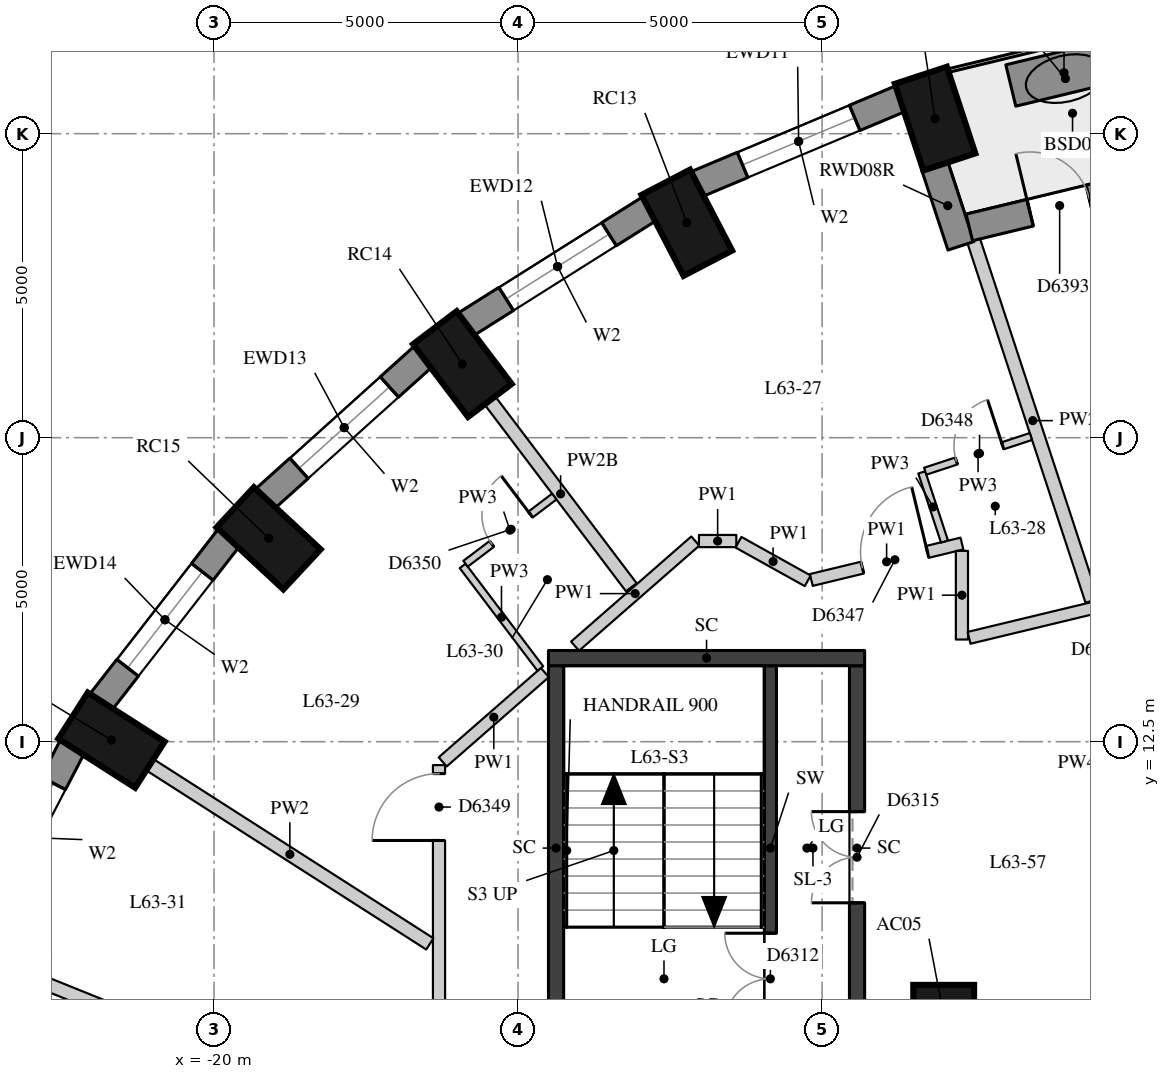
"""IFC4 building model, lengths in metres.
Left out: names, types, materials, properties, quantities, classifications, styles, units other than length and angle.
Written with IfcOpenShell. Run it as: python <this file> out.ifc"""

import sys

from ifc_helpers import new_model, si_unit, direction, frame, frame_2d, origin, origin_2d, place, context, subcontext, project, spatial, rectangle, extrude, element, fill, save


model = new_model("IFC4")
c1 = context("Model", 3, precision=1e-05, world=origin(), true_north=direction((0.0, 1.0)))
c2 = subcontext(c1, "Body", "Model", "MODEL_VIEW")
j1 = project(units=[si_unit("LENGTHUNIT", "METRE"), si_unit("PLANEANGLEUNIT", "RADIAN")], contexts=[c1])
p1 = place(None, origin())
s1 = spatial("IfcSite", under=j1, at=p1, CompositionType="ELEMENT")
p2 = place(p1, origin())
s2 = spatial("IfcBuilding", under=s1, at=p2, CompositionType="ELEMENT")
p3 = place(p2, frame((0.0, 0.0, 222.2)))
s3 = spatial("IfcBuildingStorey", under=s2, at=p3, CompositionType="ELEMENT", Elevation=222.2)
for number, where, z_axis, x_axis in (
    (1, (-8.141, 22.748, 0.0), (0.0, 0.0, 1.0), (-0.312, 0.95, 0.0)),
    (2, (-12.225, 21.035, 0.0), (0.0, 0.0, 1.0), (-0.462, 0.887, 0.0)),
    (3, (-15.916, 18.71, 0.0), (0.0, 0.0, 1.0), (-0.604, 0.797, 0.0)),
    (4, (-19.102, 15.845, 0.0), (0.0, 0.0, 1.0), (-0.732, 0.681, 0.0)),
    (5, (-21.687, 12.525, 0.0), (0.0, 0.0, 1.0), (-0.842, 0.539, 0.0)),
):
    element("IfcColumn", number, at=place(p3, frame(where, z_axis=z_axis, x_axis=x_axis)), inside=s3, PredefinedType="COLUMN", context=c2, shape_type="SweptSolid", body=[
        extrude(rectangle(XDim=1.5, YDim=0.9, at=origin_2d()), origin(), (0.0, 0.0, 1.0), 3.3),
    ])
p4 = place(p3, frame((-8.0, 8.0, 0.0), z_axis=(0.0, 0.0, 1.0), x_axis=(1.0, 0.0, 0.0)))
e6 = element("IfcColumn", 6, at=p4, inside=s3, PredefinedType="COLUMN", context=c2, shape_type="SweptSolid", body=[
    extrude(rectangle(XDim=1.0, YDim=1.0, at=origin_2d()), origin(), (0.0, 0.0, 1.0), 3.3),
])
p5 = place(p3, frame((-8.703, 23.079, 0.0), z_axis=(0.0, 0.0, 1.0), x_axis=(-0.922168222612, -0.386789050006, 0.0)))
e7 = element("IfcWall", 7, at=p5, inside=s3, PredefinedType="SOLIDWALL", context=c2, shape_type="SweptSolid", body=[
    extrude(rectangle(XDim=3.651, YDim=0.45, at=frame_2d((1.825, 0.0))), origin(), (0.0, 0.0, 1.0), 3.02),
])
p6 = place(p5, frame((0.825, 0.0, 0.4)))
e8 = element("IfcOpeningElement", 8, at=p6, cuts=e7, PredefinedType="OPENING", context=c2, shape_type="SweptSolid", body=[
    extrude(rectangle(XDim=2.0, YDim=1.75, at=frame_2d((1.0, 0.875))), frame((0.0, 0.235, 0.0), z_axis=(0.0, -1.0, 0.0), x_axis=(1.0, 0.0, 0.0)), (0.0, 0.0, 1.0), 0.47),
])
p7 = place(p3, frame((-12.832, 21.27, 0.0), z_axis=(0.0, 0.0, 1.0), x_axis=(-0.846138482752, -0.532963101918, 0.0)))
e9 = element("IfcWall", 9, at=p7, inside=s3, PredefinedType="SOLIDWALL", context=c2, shape_type="SweptSolid", body=[
    extrude(rectangle(XDim=3.587, YDim=0.45, at=frame_2d((1.793, 0.0))), origin(), (0.0, 0.0, 1.0), 3.02),
])
p8 = place(p7, frame((0.793, 0.0, 0.4)))
e10 = element("IfcOpeningElement", 10, at=p8, cuts=e9, PredefinedType="OPENING", context=c2, shape_type="SweptSolid", body=[
    extrude(rectangle(XDim=2.0, YDim=1.75, at=frame_2d((1.0, 0.875))), frame((0.0, 0.235, 0.0), z_axis=(0.0, -1.0, 0.0), x_axis=(1.0, 0.0, 0.0)), (0.0, 0.0, 1.0), 0.47),
])
p9 = place(p3, frame((-16.553, 18.84, 0.0), z_axis=(0.0, 0.0, 1.0), x_axis=(-0.743442727602, -0.668799604348, 0.0)))
e11 = element("IfcWall", 11, at=p9, inside=s3, PredefinedType="SOLIDWALL", context=c2, shape_type="SweptSolid", body=[
    extrude(rectangle(XDim=3.513, YDim=0.45, at=frame_2d((1.756, 0.0))), origin(), (0.0, 0.0, 1.0), 3.02),
])
p10 = place(p9, frame((0.756, 0.0, 0.4)))
e12 = element("IfcOpeningElement", 12, at=p10, cuts=e11, PredefinedType="OPENING", context=c2, shape_type="SweptSolid", body=[
    extrude(rectangle(XDim=2.0, YDim=1.75, at=frame_2d((1.0, 0.875))), frame((0.0, 0.235, 0.0), z_axis=(0.0, -1.0, 0.0), x_axis=(1.0, 0.0, 0.0)), (0.0, 0.0, 1.0), 0.47),
])
p11 = place(p3, frame((-19.751, 15.861, 0.0), z_axis=(0.0, 0.0, 1.0), x_axis=(-0.614220816451, -0.789134201919, 0.0)))
e13 = element("IfcWall", 13, at=p11, inside=s3, PredefinedType="SOLIDWALL", context=c2, shape_type="SweptSolid", body=[
    extrude(rectangle(XDim=3.438, YDim=0.45, at=frame_2d((1.719, 0.0))), origin(), (0.0, 0.0, 1.0), 3.02),
])
p12 = place(p11, frame((0.719, 0.0, 0.4)))
e14 = element("IfcOpeningElement", 14, at=p12, cuts=e13, PredefinedType="OPENING", context=c2, shape_type="SweptSolid", body=[
    extrude(rectangle(XDim=2.0, YDim=1.75, at=frame_2d((1.0, 0.875))), frame((0.0, 0.235, 0.0), z_axis=(0.0, -1.0, 0.0), x_axis=(1.0, 0.0, 0.0)), (0.0, 0.0, 1.0), 0.47),
])
p13 = place(p3, frame((-22.327, 12.424, 0.0), z_axis=(0.0, 0.0, 1.0), x_axis=(-0.460232593174, -0.887798378113, 0.0)))
e15 = element("IfcWall", 15, at=p13, inside=s3, PredefinedType="SOLIDWALL", context=c2, shape_type="SweptSolid", body=[
    extrude(rectangle(XDim=3.371, YDim=0.45, at=frame_2d((1.685, 0.0))), origin(), (0.0, 0.0, 1.0), 3.02),
])
p14 = place(p13, frame((0.685, 0.0, 0.4)))
e16 = element("IfcOpeningElement", 16, at=p14, cuts=e15, PredefinedType="OPENING", context=c2, shape_type="SweptSolid", body=[
    extrude(rectangle(XDim=2.0, YDim=1.75, at=frame_2d((1.0, 0.875))), frame((0.0, 0.235, 0.0), z_axis=(0.0, -1.0, 0.0), x_axis=(1.0, 0.0, 0.0)), (0.0, 0.0, 1.0), 0.47),
])
p15 = place(p3, frame((-8.15, 21.977, 0.0), z_axis=(0.0, 0.0, 1.0), x_axis=(0.312062715826, -0.950061504005, 0.0)))
e17 = element("IfcWall", 17, at=p15, inside=s3, PredefinedType="SOLIDWALL", context=c2, shape_type="SweptSolid", body=[
    extrude(rectangle(XDim=1.39, YDim=0.45, at=frame_2d((0.695, 0.0))), origin(), (0.0, 0.0, 1.0), 3.02),
])
p16 = place(p3, frame((-3.489, 21.947, 0.0), z_axis=(0.0, 0.0, 1.0), x_axis=(-0.972007311035, -0.234950606076, 0.0)))
e18 = element("IfcWall", 18, at=p16, inside=s3, PredefinedType="SOLIDWALL", context=c2, shape_type="SweptSolid", body=[
    extrude(rectangle(XDim=4.207, YDim=0.45, at=frame_2d((2.104, 0.0))), origin(), (0.0, 0.0, 1.0), 3.02),
])
p17 = place(p16, frame((1.029, 0.0, 0.4)))
e19 = element("IfcOpeningElement", 19, at=p17, cuts=e18, PredefinedType="OPENING", context=c2, shape_type="SweptSolid", body=[
    extrude(rectangle(XDim=1.0, YDim=1.75, at=frame_2d((0.5, 0.875))), frame((0.0, 0.235, 0.0), z_axis=(0.0, -1.0, 0.0), x_axis=(1.0, 0.0, 0.0)), (0.0, 0.0, 1.0), 0.47),
])
p18 = place(p16, frame((2.179, 0.0, 0.0)))
e20 = element("IfcOpeningElement", 20, at=p18, cuts=e18, PredefinedType="OPENING", context=c2, shape_type="SweptSolid", body=[
    extrude(rectangle(XDim=1.0, YDim=2.15, at=frame_2d((0.5, 1.075))), frame((0.0, 0.235, 0.0), z_axis=(0.0, -1.0, 0.0), x_axis=(1.0, 0.0, 0.0)), (0.0, 0.0, 1.0), 0.47),
])
p19 = place(p3, frame((-5.146, 23.714, 0.0), z_axis=(0.0, 0.0, 1.0), x_axis=(-0.972142986016, -0.234388597717, 0.0)))
e21 = element("IfcWall", 21, at=p19, inside=s3, PredefinedType="USERDEFINED", context=c2, shape_type="SweptSolid", body=[
    extrude(rectangle(XDim=1.8, YDim=0.7, at=frame_2d((0.9, 0.0))), origin(), (0.0, 0.0, 1.0), 0.75),
])
p20 = place(p3, frame((-10.85, 7.75, 0.0), z_axis=(0.0, 0.0, 1.0), x_axis=(0.0, 1.0, 0.0)))
e22 = element("IfcWall", 22, at=p20, inside=s3, PredefinedType="SHEAR", context=c2, shape_type="SweptSolid", body=[
    extrude(rectangle(XDim=6.0, YDim=0.2, at=frame_2d((3.0, 0.0))), origin(), (0.0, 0.0, 1.0), 3.02),
])
p21 = place(p20, frame((0.1, 0.0, 0.0)))
e23 = element("IfcOpeningElement", 23, at=p21, cuts=e22, PredefinedType="OPENING", context=c2, shape_type="SweptSolid", body=[
    extrude(rectangle(XDim=1.5, YDim=2.1, at=frame_2d((0.75, 1.05))), frame((0.0, 0.11, 0.0), z_axis=(0.0, -1.0, 0.0), x_axis=(1.0, 0.0, 0.0)), (0.0, 0.0, 1.0), 0.22),
])
p22 = place(p3, frame((-14.375, 7.75, -0.28), z_axis=(0.0, 0.0, 1.0), x_axis=(0.0, 1.0, 0.0)))
e24 = element("IfcWall", 24, at=p22, inside=s3, PredefinedType="SHEAR", context=c2, shape_type="SweptSolid", body=[
    extrude(rectangle(XDim=6.0, YDim=0.25, at=frame_2d((3.0, 0.0))), origin(), (0.0, 0.0, 1.0), 3.3),
])
p23 = place(p3, frame((-9.425, 7.75, -0.28), z_axis=(0.0, 0.0, 1.0), x_axis=(0.0, 1.0, 0.0)))
e25 = element("IfcWall", 25, at=p23, inside=s3, PredefinedType="SHEAR", context=c2, shape_type="SweptSolid", body=[
    extrude(rectangle(XDim=6.0, YDim=0.25, at=frame_2d((3.0, 0.0))), origin(), (0.0, 0.0, 1.0), 3.3),
])
p24 = place(p23, frame((2.1, 0.0, 0.28)))
e26 = element("IfcOpeningElement", 26, at=p24, cuts=e25, PredefinedType="OPENING", context=c2, shape_type="SweptSolid", body=[
    extrude(rectangle(XDim=1.5, YDim=2.1, at=frame_2d((0.75, 1.05))), frame((0.0, 0.135, 0.0), z_axis=(0.0, -1.0, 0.0), x_axis=(1.0, 0.0, 0.0)), (0.0, 0.0, 1.0), 0.27),
])
p25 = place(p3, frame((-14.5, 13.875, -0.28), z_axis=(0.0, 0.0, 1.0), x_axis=(1.0, 0.0, 0.0)))
e27 = element("IfcWall", 27, at=p25, inside=s3, PredefinedType="SHEAR", context=c2, shape_type="SweptSolid", body=[
    extrude(rectangle(XDim=5.2, YDim=0.25, at=frame_2d((2.6, 0.0))), origin(), (0.0, 0.0, 1.0), 3.3),
])
p26 = place(p3, frame((-16.3, 3.922, 0.0), z_axis=(0.0, 0.0, 1.0), x_axis=(0.0, 1.0, 0.0)))
e28 = element("IfcWall", 28, at=p26, inside=s3, PredefinedType="PARTITIONING", context=c2, shape_type="SweptSolid", body=[
    extrude(rectangle(XDim=8.193, YDim=0.2, at=frame_2d((4.097, 0.0))), origin(), (0.0, 0.0, 1.0), 3.02),
])
p27 = place(p26, frame((6.953, 0.0, 0.0)))
e29 = element("IfcOpeningElement", 29, at=p27, cuts=e28, PredefinedType="OPENING", context=c2, shape_type="SweptSolid", body=[
    extrude(rectangle(XDim=1.1, YDim=2.1, at=frame_2d((0.55, 1.05))), frame((0.0, 0.11, 0.0), z_axis=(0.0, -1.0, 0.0), x_axis=(1.0, 0.0, 0.0)), (0.0, 0.0, 1.0), 0.22),
])
p28 = place(p26, frame((3.123, 0.0, 0.0)))
e30 = element("IfcOpeningElement", 30, at=p28, cuts=e28, PredefinedType="OPENING", context=c2, shape_type="SweptSolid", body=[
    extrude(rectangle(XDim=0.9, YDim=2.1, at=frame_2d((0.45, 1.05))), frame((0.0, 0.11, 0.0), z_axis=(0.0, -1.0, 0.0), x_axis=(1.0, 0.0, 0.0)), (0.0, 0.0, 1.0), 0.22),
])
p29 = place(p3, frame((-16.24, 12.168, 0.0), z_axis=(0.0, 0.0, 1.0), x_axis=(0.752820521129, 0.658225844956, 0.0)))
e31 = element("IfcWall", 31, at=p29, inside=s3, PredefinedType="PARTITIONING", context=c2, shape_type="SweptSolid", body=[
    extrude(rectangle(XDim=2.232, YDim=0.2, at=frame_2d((1.116, 0.0))), origin(), (0.0, 0.0, 1.0), 3.02),
])
p30 = place(p3, frame((-14.063, 14.071, 0.0), z_axis=(0.0, 0.0, 1.0), x_axis=(0.752870230185, 0.6581689878, 0.0)))
e32 = element("IfcWall", 32, at=p30, inside=s3, PredefinedType="PARTITIONING", context=c2, shape_type="SweptSolid", body=[
    extrude(rectangle(XDim=2.627, YDim=0.2, at=frame_2d((1.313, 0.0))), origin(), (0.0, 0.0, 1.0), 3.02),
])
p31 = place(p3, frame((-12.025, 15.8, 0.0), z_axis=(0.0, 0.0, 1.0), x_axis=(1.0, 0.0, 0.0)))
e33 = element("IfcWall", 33, at=p31, inside=s3, PredefinedType="PARTITIONING", context=c2, shape_type="SweptSolid", body=[
    extrude(rectangle(XDim=0.615, YDim=0.2, at=frame_2d((0.307, 0.0))), origin(), (0.0, 0.0, 1.0), 3.02),
])
p32 = place(p3, frame((-11.375, 15.781, 0.0), z_axis=(0.0, 0.0, 1.0), x_axis=(0.873538410035, -0.486755222051, 0.0)))
e34 = element("IfcWall", 34, at=p32, inside=s3, PredefinedType="PARTITIONING", context=c2, shape_type="SweptSolid", body=[
    extrude(rectangle(XDim=1.304, YDim=0.2, at=frame_2d((0.652, 0.0))), origin(), (0.0, 0.0, 1.0), 3.02),
])
p33 = place(p3, frame((-10.177, 15.16, 0.0), z_axis=(0.0, 0.0, 1.0), x_axis=(0.971984190663, 0.235046236094, 0.0)))
e35 = element("IfcWall", 35, at=p33, inside=s3, PredefinedType="PARTITIONING", context=c2, shape_type="SweptSolid", body=[
    extrude(rectangle(XDim=2.549, YDim=0.2, at=frame_2d((1.274, 0.0))), origin(), (0.0, 0.0, 1.0), 3.02),
])
p34 = place(p33, frame((0.865, 0.0, 0.0)))
e36 = element("IfcOpeningElement", 36, at=p34, cuts=e35, PredefinedType="OPENING", context=c2, shape_type="SweptSolid", body=[
    extrude(rectangle(XDim=1.1, YDim=2.1, at=frame_2d((0.55, 1.05))), frame((0.0, 0.11, 0.0), z_axis=(0.0, -1.0, 0.0), x_axis=(1.0, 0.0, 0.0)), (0.0, 0.0, 1.0), 0.22),
])
p35 = place(p3, frame((-7.7, 15.639, 0.0), z_axis=(0.0, 0.0, 1.0), x_axis=(0.0, -1.0, 0.0)))
e37 = element("IfcWall", 37, at=p35, inside=s3, PredefinedType="PARTITIONING", context=c2, shape_type="SweptSolid", body=[
    extrude(rectangle(XDim=1.458, YDim=0.2, at=frame_2d((0.729, 0.0))), origin(), (0.0, 0.0, 1.0), 3.02),
])
p36 = place(p3, frame((-7.583, 14.208, 0.0), z_axis=(0.0, 0.0, 1.0), x_axis=(0.972284712223, 0.233799996531, 0.0)))
e38 = element("IfcWall", 38, at=p36, inside=s3, PredefinedType="PARTITIONING", context=c2, shape_type="SweptSolid", body=[
    extrude(rectangle(XDim=8.519, YDim=0.2, at=frame_2d((4.259, 0.0))), origin(), (0.0, 0.0, 1.0), 2.42),
])
p37 = place(p36, frame((5.667, 0.0, 0.0)))
e39 = element("IfcOpeningElement", 39, at=p37, cuts=e38, PredefinedType="OPENING", context=c2, shape_type="SweptSolid", body=[
    extrude(rectangle(XDim=0.9, YDim=2.1, at=frame_2d((0.45, 1.05))), frame((0.0, 0.11, 0.0), z_axis=(0.0, -1.0, 0.0), x_axis=(1.0, 0.0, 0.0)), (0.0, 0.0, 1.0), 0.22),
])
p38 = place(p36, frame((2.674, 0.0, 0.0)))
e40 = element("IfcOpeningElement", 40, at=p38, cuts=e38, PredefinedType="OPENING", context=c2, shape_type="SweptSolid", body=[
    extrude(rectangle(XDim=0.9, YDim=2.1, at=frame_2d((0.45, 1.05))), frame((0.0, 0.11, 0.0), z_axis=(0.0, -1.0, 0.0), x_axis=(1.0, 0.0, 0.0)), (0.0, 0.0, 1.0), 0.22),
])
p39 = place(p3, frame((-7.508, 20.743, 0.0), z_axis=(0.0, 0.0, 1.0), x_axis=(0.311985211021, -0.95008695818, 0.0)))
e41 = element("IfcWall", 41, at=p39, inside=s3, PredefinedType="PARTITIONING", context=c2, shape_type="SweptSolid", body=[
    extrude(rectangle(XDim=6.237, YDim=0.22, at=frame_2d((3.118, 0.0))), origin(), (0.0, 0.0, 1.0), 3.02),
])
p40 = place(p3, frame((-15.463, 18.113, 0.0), z_axis=(0.0, 0.0, 1.0), x_axis=(0.603591792806, -0.79729351412, 0.0)))
e42 = element("IfcWall", 42, at=p40, inside=s3, PredefinedType="PARTITIONING", context=c2, shape_type="SweptSolid", body=[
    extrude(rectangle(XDim=3.854, YDim=0.22, at=frame_2d((1.927, 0.0))), origin(), (0.0, 0.0, 1.0), 2.57),
])
p41 = place(p3, frame((-21.055, 12.121, 0.0), z_axis=(0.0, 0.0, 1.0), x_axis=(0.842286811608, -0.539029616061, 0.0)))
e43 = element("IfcWall", 43, at=p41, inside=s3, PredefinedType="PARTITIONING", context=c2, shape_type="SweptSolid", body=[
    extrude(rectangle(XDim=5.466, YDim=0.22, at=frame_2d((2.733, 0.0))), origin(), (0.0, 0.0, 1.0), 3.02),
])
p42 = place(p3, frame((-22.896, 8.571, 0.0), z_axis=(0.0, 0.0, 1.0), x_axis=(0.927387137769, -0.374103056256, 0.0)))
e44 = element("IfcWall", 44, at=p42, inside=s3, PredefinedType="PARTITIONING", context=c2, shape_type="SweptSolid", body=[
    extrude(rectangle(XDim=6.964, YDim=0.22, at=frame_2d((3.482, 0.0))), origin(), (0.0, 0.0, 1.0), 3.02),
])
p43 = place(p3, frame((-7.987, 15.792, 0.0), z_axis=(0.0, 0.0, 1.0), x_axis=(-0.312187467963, 0.950020518119, 0.0)))
e45 = element("IfcWall", 45, at=p43, inside=s3, PredefinedType="PARTITIONING", context=c2, shape_type="SweptSolid", body=[
    extrude(rectangle(XDim=1.197, YDim=0.12, at=frame_2d((0.599, 0.0))), origin(), (0.0, 0.0, 1.0), 3.02),
])
p44 = place(p3, frame((-14.634, 13.704, 0.0), z_axis=(0.0, 0.0, 1.0), x_axis=(-0.603613230526, 0.797277284221, 0.0)))
e46 = element("IfcWall", 46, at=p44, inside=s3, PredefinedType="PARTITIONING", context=c2, shape_type="SweptSolid", body=[
    extrude(rectangle(XDim=2.115, YDim=0.12, at=frame_2d((1.058, 0.0))), origin(), (0.0, 0.0, 1.0), 3.02),
])
p45 = place(p3, frame((-8.304, 16.948, 0.0), z_axis=(0.0, 0.0, 1.0), x_axis=(0.95011423119, 0.311902144415, 0.0)))
e47 = element("IfcWall", 47, at=p45, inside=s3, PredefinedType="PARTITIONING", context=c2, shape_type="SweptSolid", body=[
    extrude(rectangle(XDim=1.83, YDim=0.12, at=frame_2d((0.915, 0.0))), origin(), (0.0, 0.0, 1.0), 3.02),
])
p46 = place(p45, frame((0.54, 0.0, 0.0)))
e48 = element("IfcOpeningElement", 48, at=p46, cuts=e47, PredefinedType="OPENING", context=c2, shape_type="SweptSolid", body=[
    extrude(rectangle(XDim=0.8, YDim=2.1, at=frame_2d((0.4, 1.05))), frame((0.0, 0.07, 0.0), z_axis=(0.0, -1.0, 0.0), x_axis=(1.0, 0.0, 0.0)), (0.0, 0.0, 1.0), 0.14),
])
p47 = place(p3, frame((-15.863, 15.427, 0.0), z_axis=(0.0, 0.0, 1.0), x_axis=(0.79730226728, 0.603580230451, 0.0)))
e49 = element("IfcWall", 49, at=p47, inside=s3, PredefinedType="PARTITIONING", context=c2, shape_type="SweptSolid", body=[
    extrude(rectangle(XDim=1.83, YDim=0.12, at=frame_2d((0.915, 0.0))), origin(), (0.0, 0.0, 1.0), 3.02),
])
p48 = place(p47, frame((0.54, 0.0, 0.0)))
e50 = element("IfcOpeningElement", 50, at=p48, cuts=e49, PredefinedType="OPENING", context=c2, shape_type="SweptSolid", body=[
    extrude(rectangle(XDim=0.8, YDim=2.1, at=frame_2d((0.4, 1.05))), frame((0.0, 0.07, 0.0), z_axis=(0.0, -1.0, 0.0), x_axis=(1.0, 0.0, 0.0)), (0.0, 0.0, 1.0), 0.14),
])
p49 = place(p6, origin())
e51 = element("IfcWindow", 51, at=p49, inside=s3, PartitioningType="SINGLE_PANEL", PredefinedType="WINDOW", context=c2, shape_type="SweptSolid", body=[
    extrude(rectangle(XDim=2.0, YDim=1.75, at=frame_2d((1.0, 0.875))), frame((0.0, 0.035, 0.0), z_axis=(0.0, -1.0, 0.0), x_axis=(1.0, 0.0, 0.0)), (0.0, 0.0, 1.0), 0.06),
])
fill(e8, e51)
p50 = place(p8, origin())
e52 = element("IfcWindow", 52, at=p50, inside=s3, PartitioningType="SINGLE_PANEL", PredefinedType="WINDOW", context=c2, shape_type="SweptSolid", body=[
    extrude(rectangle(XDim=2.0, YDim=1.75, at=frame_2d((1.0, 0.875))), frame((0.0, 0.035, 0.0), z_axis=(0.0, -1.0, 0.0), x_axis=(1.0, 0.0, 0.0)), (0.0, 0.0, 1.0), 0.06),
])
fill(e10, e52)
p51 = place(p10, origin())
e53 = element("IfcWindow", 53, at=p51, inside=s3, PartitioningType="SINGLE_PANEL", PredefinedType="WINDOW", context=c2, shape_type="SweptSolid", body=[
    extrude(rectangle(XDim=2.0, YDim=1.75, at=frame_2d((1.0, 0.875))), frame((0.0, 0.035, 0.0), z_axis=(0.0, -1.0, 0.0), x_axis=(1.0, 0.0, 0.0)), (0.0, 0.0, 1.0), 0.06),
])
fill(e12, e53)
p52 = place(p12, origin())
e54 = element("IfcWindow", 54, at=p52, inside=s3, PartitioningType="SINGLE_PANEL", PredefinedType="WINDOW", context=c2, shape_type="SweptSolid", body=[
    extrude(rectangle(XDim=2.0, YDim=1.75, at=frame_2d((1.0, 0.875))), frame((0.0, 0.035, 0.0), z_axis=(0.0, -1.0, 0.0), x_axis=(1.0, 0.0, 0.0)), (0.0, 0.0, 1.0), 0.06),
])
fill(e14, e54)
p53 = place(p14, origin())
e55 = element("IfcWindow", 55, at=p53, inside=s3, PartitioningType="SINGLE_PANEL", PredefinedType="WINDOW", context=c2, shape_type="SweptSolid", body=[
    extrude(rectangle(XDim=2.0, YDim=1.75, at=frame_2d((1.0, 0.875))), frame((0.0, 0.035, 0.0), z_axis=(0.0, -1.0, 0.0), x_axis=(1.0, 0.0, 0.0)), (0.0, 0.0, 1.0), 0.06),
])
fill(e16, e55)
p54 = place(p18, frame((1.0, 0.0, 0.0), z_axis=(0.0, 0.0, 1.0), x_axis=(-1.0, 0.0, 0.0)))
e56 = element("IfcDoor", 56, at=p54, inside=s3, OperationType="SINGLE_SWING_LEFT", PredefinedType="DOOR", context=c2, shape_type="SweptSolid", body=[
    extrude(rectangle(XDim=1.0, YDim=2.15, at=frame_2d((0.5, 1.075))), frame((0.0, 0.075, 0.0), z_axis=(0.0, -1.0, 0.0), x_axis=(1.0, 0.0, 0.0)), (0.0, 0.0, 1.0), 0.05),
])
fill(e20, e56)
p55 = place(p21, origin())
e57 = element("IfcDoor", 57, at=p55, inside=s3, OperationType="DOUBLE_DOOR_SINGLE_SWING", PredefinedType="DOOR", context=c2, shape_type="SweptSolid", body=[
    extrude(rectangle(XDim=1.5, YDim=2.1, at=frame_2d((0.75, 1.05))), frame((0.0, 0.025, 0.0), z_axis=(0.0, -1.0, 0.0), x_axis=(1.0, 0.0, 0.0)), (0.0, 0.0, 1.0), 0.05),
])
fill(e23, e57)
p56 = place(p24, origin())
e58 = element("IfcDoor", 58, at=p56, inside=s3, OperationType="DOUBLE_DOOR_SINGLE_SWING", PredefinedType="DOOR", context=c2, shape_type="SweptSolid", body=[
    extrude(rectangle(XDim=1.5, YDim=2.1, at=frame_2d((0.75, 1.05))), frame((0.0, 0.025, 0.0), z_axis=(0.0, -1.0, 0.0), x_axis=(1.0, 0.0, 0.0)), (0.0, 0.0, 1.0), 0.05),
])
fill(e26, e58)
p57 = place(p34, origin())
e59 = element("IfcDoor", 59, at=p57, inside=s3, OperationType="SINGLE_SWING_RIGHT", PredefinedType="DOOR", context=c2, shape_type="SweptSolid", body=[
    extrude(rectangle(XDim=1.1, YDim=2.1, at=frame_2d((0.55, 1.05))), frame((0.0, 0.025, 0.0), z_axis=(0.0, -1.0, 0.0), x_axis=(1.0, 0.0, 0.0)), (0.0, 0.0, 1.0), 0.05),
])
fill(e36, e59)
p58 = place(p46, origin())
e60 = element("IfcDoor", 60, at=p58, inside=s3, OperationType="SINGLE_SWING_RIGHT", PredefinedType="DOOR", context=c2, shape_type="SweptSolid", body=[
    extrude(rectangle(XDim=0.8, YDim=2.1, at=frame_2d((0.4, 1.05))), frame((0.0, 0.025, 0.0), z_axis=(0.0, -1.0, 0.0), x_axis=(1.0, 0.0, 0.0)), (0.0, 0.0, 1.0), 0.05),
])
fill(e48, e60)
p59 = place(p27, origin())
e61 = element("IfcDoor", 61, at=p59, inside=s3, OperationType="SINGLE_SWING_LEFT", PredefinedType="DOOR", context=c2, shape_type="SweptSolid", body=[
    extrude(rectangle(XDim=1.1, YDim=2.1, at=frame_2d((0.55, 1.05))), frame((0.0, 0.025, 0.0), z_axis=(0.0, -1.0, 0.0), x_axis=(1.0, 0.0, 0.0)), (0.0, 0.0, 1.0), 0.05),
])
fill(e29, e61)
p60 = place(p48, origin())
e62 = element("IfcDoor", 62, at=p60, inside=s3, OperationType="SINGLE_SWING_RIGHT", PredefinedType="DOOR", context=c2, shape_type="SweptSolid", body=[
    extrude(rectangle(XDim=0.8, YDim=2.1, at=frame_2d((0.4, 1.05))), frame((0.0, 0.025, 0.0), z_axis=(0.0, -1.0, 0.0), x_axis=(1.0, 0.0, 0.0)), (0.0, 0.0, 1.0), 0.05),
])
fill(e50, e62)
save(model, sys.argv[1])
